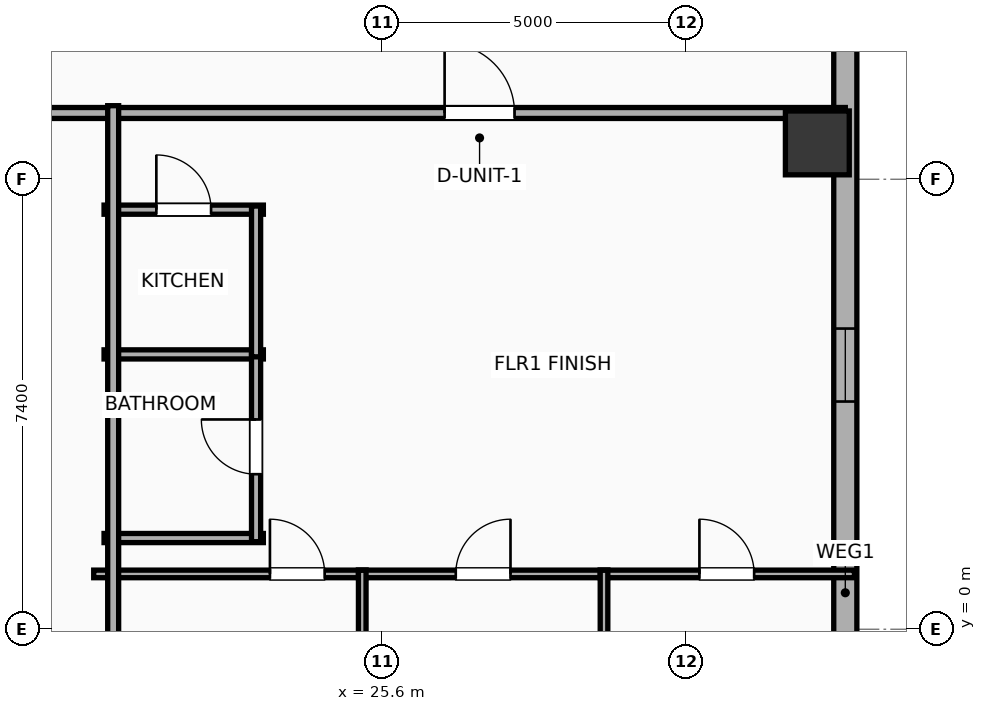
"""IFC4 building model, lengths in metres.
Left out: names, types, materials, properties, quantities, classifications, styles, units other than length and angle.
Written with IfcOpenShell. Run it as: python <this file> out.ifc"""

import sys

from ifc_helpers import new_model, si_unit, direction, frame, frame_2d, origin, origin_2d, place, context, subcontext, project, spatial, rectangle, hollow_rectangle, extrude, element, fill, save


model = new_model("IFC4")
c1 = context("Model", 3, precision=1e-05, world=origin(), true_north=direction((0.0, 1.0)))
c2 = subcontext(c1, "Body", "Model", "MODEL_VIEW")
j1 = project(units=[si_unit("LENGTHUNIT", "METRE"), si_unit("PLANEANGLEUNIT", "RADIAN")], contexts=[c1])
p1 = place(None, origin())
s1 = spatial("IfcSite", under=j1, at=p1, CompositionType="ELEMENT")
p2 = place(p1, origin())
s2 = spatial("IfcBuilding", under=s1, at=p2, CompositionType="ELEMENT")
p3 = place(p2, frame((0.0, 0.0, 124.8)))
s3 = spatial("IfcBuildingStorey", under=s2, at=p3, CompositionType="ELEMENT", Elevation=124.8)
p4 = place(p3, frame((32.75, 7.998, 0.0), z_axis=(0.0, 0.0, 1.0), x_axis=(1.0, 0.0, 0.0)))
e1 = element("IfcColumn", 1, at=p4, inside=s3, PredefinedType="COLUMN", context=c2, shape_type="SweptSolid", body=[
    extrude(hollow_rectangle(XDim=1.05, YDim=1.05, WallThickness=0.036, at=origin_2d()), origin(), (0.0, 0.0, 1.0), 3.9),
])
p5 = place(p3, frame((33.21, 17.781, 0.0), z_axis=(0.0, 0.0, 1.0), x_axis=(0.0, -1.0, 0.0)))
e2 = element("IfcWall", 2, at=p5, inside=s3, PredefinedType="ELEMENTEDWALL", context=c2, shape_type="SweptSolid", body=[
    extrude(rectangle(XDim=34.363, YDim=0.38, at=frame_2d((17.181, 0.0))), origin(), (0.0, 0.0, 1.0), 3.65),
])
p6 = place(p5, frame((12.836, 0.0, 0.75)))
e3 = element("IfcOpeningElement", 3, at=p6, cuts=e2, PredefinedType="OPENING", context=c2, shape_type="SweptSolid", body=[
    extrude(rectangle(XDim=1.2, YDim=2.05, at=frame_2d((0.6, 1.025))), frame((0.0, 0.2, 0.0), z_axis=(0.0, -1.0, 0.0), x_axis=(1.0, 0.0, 0.0)), (0.0, 0.0, 1.0), 0.4),
])
p7 = place(p5, frame((21.386, 0.0, 0.75)))
e4 = element("IfcOpeningElement", 4, at=p7, cuts=e2, PredefinedType="OPENING", context=c2, shape_type="SweptSolid", body=[
    extrude(rectangle(XDim=1.2, YDim=2.05, at=frame_2d((0.6, 1.025))), frame((0.0, 0.2, 0.0), z_axis=(0.0, -1.0, 0.0), x_axis=(1.0, 0.0, 0.0)), (0.0, 0.0, 1.0), 0.4),
])
p8 = place(p3, frame((9.88, 8.49, 0.0), z_axis=(0.0, 0.0, 1.0), x_axis=(1.0, 0.0, 0.0)))
e5 = element("IfcWall", 5, at=p8, inside=s3, PredefinedType="PARTITIONING", context=c2, shape_type="SweptSolid", body=[
    extrude(rectangle(XDim=23.33, YDim=0.18, at=frame_2d((11.665, 0.0))), origin(), (0.0, 0.0, 1.0), 3.65),
])
p9 = place(p8, frame((16.74, 0.0, 0.0)))
e6 = element("IfcOpeningElement", 6, at=p9, cuts=e5, PredefinedType="OPENING", context=c2, shape_type="SweptSolid", body=[
    extrude(rectangle(XDim=1.15, YDim=2.05, at=frame_2d((0.575, 1.025))), frame((0.0, 0.1, 0.0), z_axis=(0.0, -1.0, 0.0), x_axis=(1.0, 0.0, 0.0)), (0.0, 0.0, 1.0), 0.2),
])
p10 = place(p3, frame((21.02, 6.9, 0.0), z_axis=(0.0, 0.0, 1.0), x_axis=(1.0, 0.0, 0.0)))
e7 = element("IfcWall", 7, at=p10, inside=s3, PredefinedType="PLUMBINGWALL", context=c2, shape_type="SweptSolid", body=[
    extrude(rectangle(XDim=2.62, YDim=0.15, at=frame_2d((1.31, 0.0))), origin(), (0.0, 0.0, 1.0), 3.65),
])
p11 = place(p10, frame((0.86, 0.0, 0.0)))
e8 = element("IfcOpeningElement", 8, at=p11, cuts=e7, PredefinedType="OPENING", context=c2, shape_type="SweptSolid", body=[
    extrude(rectangle(XDim=0.9, YDim=2.05, at=frame_2d((0.45, 1.025))), frame((0.0, 0.085, 0.0), z_axis=(0.0, -1.0, 0.0), x_axis=(1.0, 0.0, 0.0)), (0.0, 0.0, 1.0), 0.17),
])
for number, where, z_axis, x_axis in (
    (9, (21.02, 4.52, 0.0), (0.0, 0.0, 1.0), (1.0, 0.0, 0.0)),
    (10, (21.02, 1.5, 0.0), (0.0, 0.0, 1.0), (1.0, 0.0, 0.0)),
):
    element("IfcWall", number, at=place(p3, frame(where, z_axis=z_axis, x_axis=x_axis)), inside=s3, PredefinedType="PLUMBINGWALL", context=c2, shape_type="SweptSolid", body=[
        extrude(rectangle(XDim=2.62, YDim=0.15, at=frame_2d((1.31, 0.0))), origin(), (0.0, 0.0, 1.0), 3.65),
    ])
p12 = place(p3, frame((23.52, 1.44, 0.0), z_axis=(0.0, 0.0, 1.0), x_axis=(0.0, 1.0, 0.0)))
e11 = element("IfcWall", 11, at=p12, inside=s3, PredefinedType="PLUMBINGWALL", context=c2, shape_type="SweptSolid", body=[
    extrude(rectangle(XDim=3.12, YDim=0.15, at=frame_2d((1.56, 0.0))), origin(), (0.0, 0.0, 1.0), 3.65),
])
p13 = place(p12, frame((1.11, 0.0, 0.0)))
e12 = element("IfcOpeningElement", 12, at=p13, cuts=e11, PredefinedType="OPENING", context=c2, shape_type="SweptSolid", body=[
    extrude(rectangle(XDim=0.9, YDim=2.05, at=frame_2d((0.45, 1.025))), frame((0.0, 0.085, 0.0), z_axis=(0.0, -1.0, 0.0), x_axis=(1.0, 0.0, 0.0)), (0.0, 0.0, 1.0), 0.17),
])
p14 = place(p3, frame((23.52, 4.48, 0.0), z_axis=(0.0, 0.0, 1.0), x_axis=(0.0, 1.0, 0.0)))
e13 = element("IfcWall", 13, at=p14, inside=s3, PredefinedType="PLUMBINGWALL", context=c2, shape_type="SweptSolid", body=[
    extrude(rectangle(XDim=2.48, YDim=0.15, at=frame_2d((1.24, 0.0))), origin(), (0.0, 0.0, 1.0), 3.65),
])
p15 = place(p3, frame((20.85, 0.91, 0.0), z_axis=(0.0, 0.0, 1.0), x_axis=(1.0, 0.0, 0.0)))
e14 = element("IfcWall", 14, at=p15, inside=s3, PredefinedType="PARTITIONING", context=c2, shape_type="SweptSolid", body=[
    extrude(rectangle(XDim=4.479, YDim=0.125, at=frame_2d((2.239, 0.0))), origin(), (0.0, 0.0, 1.0), 3.65),
])
p16 = place(p15, frame((2.898, 0.0, 0.0)))
e15 = element("IfcOpeningElement", 15, at=p16, cuts=e14, PredefinedType="OPENING", context=c2, shape_type="SweptSolid", body=[
    extrude(rectangle(XDim=0.9, YDim=2.05, at=frame_2d((0.45, 1.025))), frame((0.0, 0.073, 0.0), z_axis=(0.0, -1.0, 0.0), x_axis=(1.0, 0.0, 0.0)), (0.0, 0.0, 1.0), 0.145),
])
p17 = place(p3, frame((25.204, 0.91, 0.0), z_axis=(0.0, 0.0, 1.0), x_axis=(1.0, 0.0, 0.0)))
e16 = element("IfcWall", 16, at=p17, inside=s3, PredefinedType="PARTITIONING", context=c2, shape_type="SweptSolid", body=[
    extrude(rectangle(XDim=4.101, YDim=0.125, at=frame_2d((2.05, 0.0))), origin(), (0.0, 0.0, 1.0), 3.65),
])
p18 = place(p17, frame((1.601, 0.0, 0.0)))
e17 = element("IfcOpeningElement", 17, at=p18, cuts=e16, PredefinedType="OPENING", context=c2, shape_type="SweptSolid", body=[
    extrude(rectangle(XDim=0.9, YDim=2.05, at=frame_2d((0.45, 1.025))), frame((0.0, 0.073, 0.0), z_axis=(0.0, -1.0, 0.0), x_axis=(1.0, 0.0, 0.0)), (0.0, 0.0, 1.0), 0.145),
])
p19 = place(p3, frame((29.179, 0.91, 0.0), z_axis=(0.0, 0.0, 1.0), x_axis=(1.0, 0.0, 0.0)))
e18 = element("IfcWall", 18, at=p19, inside=s3, PredefinedType="PARTITIONING", context=c2, shape_type="SweptSolid", body=[
    extrude(rectangle(XDim=4.181, YDim=0.125, at=frame_2d((2.09, 0.0))), origin(), (0.0, 0.0, 1.0), 3.65),
])
p20 = place(p19, frame((1.632, 0.0, 0.0)))
e19 = element("IfcOpeningElement", 19, at=p20, cuts=e18, PredefinedType="OPENING", context=c2, shape_type="SweptSolid", body=[
    extrude(rectangle(XDim=0.9, YDim=2.05, at=frame_2d((0.45, 1.025))), frame((0.0, 0.073, 0.0), z_axis=(0.0, -1.0, 0.0), x_axis=(1.0, 0.0, 0.0)), (0.0, 0.0, 1.0), 0.145),
])
for number, where, z_axis, x_axis in (
    (20, (29.242, -8.81, 0.0), (0.0, 0.0, 1.0), (0.0, 1.0, 0.0)),
    (21, (25.266, -8.81, 0.0), (0.0, 0.0, 1.0), (0.0, 1.0, 0.0)),
):
    element("IfcWall", number, at=place(p3, frame(where, z_axis=z_axis, x_axis=x_axis)), inside=s3, PredefinedType="PARTITIONING", context=c2, shape_type="SweptSolid", body=[
        extrude(rectangle(XDim=9.78, YDim=0.125, at=frame_2d((4.89, 0.0))), origin(), (0.0, 0.0, 1.0), 3.65),
    ])
p21 = place(p3, frame((21.17, -8.61, 0.0), z_axis=(0.0, 0.0, 1.0), x_axis=(0.0, 1.0, 0.0)))
e22 = element("IfcWall", 22, at=p21, inside=s3, PredefinedType="PARTITIONING", context=c2, shape_type="SweptSolid", body=[
    extrude(rectangle(XDim=17.22, YDim=0.18, at=frame_2d((8.61, 0.0))), origin(), (0.0, 0.0, 1.0), 3.65),
])
p22 = place(p6, origin())
e23 = element("IfcWindow", 23, at=p22, inside=s3, PartitioningType="SINGLE_PANEL", PredefinedType="WINDOW", context=c2, shape_type="SweptSolid", body=[
    extrude(rectangle(XDim=1.2, YDim=2.05, at=frame_2d((0.6, 1.025))), frame((0.0, 0.03, 0.0), z_axis=(0.0, -1.0, 0.0), x_axis=(1.0, 0.0, 0.0)), (0.0, 0.0, 1.0), 0.06),
])
fill(e3, e23)
p23 = place(p9, origin())
e24 = element("IfcDoor", 24, at=p23, inside=s3, OperationType="SINGLE_SWING_LEFT", PredefinedType="DOOR", context=c2, shape_type="SweptSolid", body=[
    extrude(rectangle(XDim=1.15, YDim=2.05, at=frame_2d((0.575, 1.025))), frame((0.0, 0.025, 0.0), z_axis=(0.0, -1.0, 0.0), x_axis=(1.0, 0.0, 0.0)), (0.0, 0.0, 1.0), 0.05),
])
fill(e6, e24)
p24 = place(p11, origin())
e25 = element("IfcDoor", 25, at=p24, inside=s3, OperationType="SINGLE_SWING_LEFT", PredefinedType="DOOR", context=c2, shape_type="SweptSolid", body=[
    extrude(rectangle(XDim=0.9, YDim=2.05, at=frame_2d((0.45, 1.025))), frame((0.0, 0.025, 0.0), z_axis=(0.0, -1.0, 0.0), x_axis=(1.0, 0.0, 0.0)), (0.0, 0.0, 1.0), 0.05),
])
fill(e8, e25)
p25 = place(p13, origin())
e26 = element("IfcDoor", 26, at=p25, inside=s3, OperationType="SINGLE_SWING_RIGHT", PredefinedType="DOOR", context=c2, shape_type="SweptSolid", body=[
    extrude(rectangle(XDim=0.9, YDim=2.05, at=frame_2d((0.45, 1.025))), frame((0.0, 0.025, 0.0), z_axis=(0.0, -1.0, 0.0), x_axis=(1.0, 0.0, 0.0)), (0.0, 0.0, 1.0), 0.05),
])
fill(e12, e26)
p26 = place(p16, origin())
e27 = element("IfcDoor", 27, at=p26, inside=s3, OperationType="SINGLE_SWING_LEFT", PredefinedType="DOOR", context=c2, shape_type="SweptSolid", body=[
    extrude(rectangle(XDim=0.9, YDim=2.05, at=frame_2d((0.45, 1.025))), frame((0.0, 0.025, 0.0), z_axis=(0.0, -1.0, 0.0), x_axis=(1.0, 0.0, 0.0)), (0.0, 0.0, 1.0), 0.05),
])
fill(e15, e27)
p27 = place(p18, origin())
e28 = element("IfcDoor", 28, at=p27, inside=s3, OperationType="SINGLE_SWING_RIGHT", PredefinedType="DOOR", context=c2, shape_type="SweptSolid", body=[
    extrude(rectangle(XDim=0.9, YDim=2.05, at=frame_2d((0.45, 1.025))), frame((0.0, 0.025, 0.0), z_axis=(0.0, -1.0, 0.0), x_axis=(1.0, 0.0, 0.0)), (0.0, 0.0, 1.0), 0.05),
])
fill(e17, e28)
p28 = place(p20, origin())
e29 = element("IfcDoor", 29, at=p28, inside=s3, OperationType="SINGLE_SWING_LEFT", PredefinedType="DOOR", context=c2, shape_type="SweptSolid", body=[
    extrude(rectangle(XDim=0.9, YDim=2.05, at=frame_2d((0.45, 1.025))), frame((0.0, 0.025, 0.0), z_axis=(0.0, -1.0, 0.0), x_axis=(1.0, 0.0, 0.0)), (0.0, 0.0, 1.0), 0.05),
])
fill(e19, e29)
save(model, sys.argv[1])
